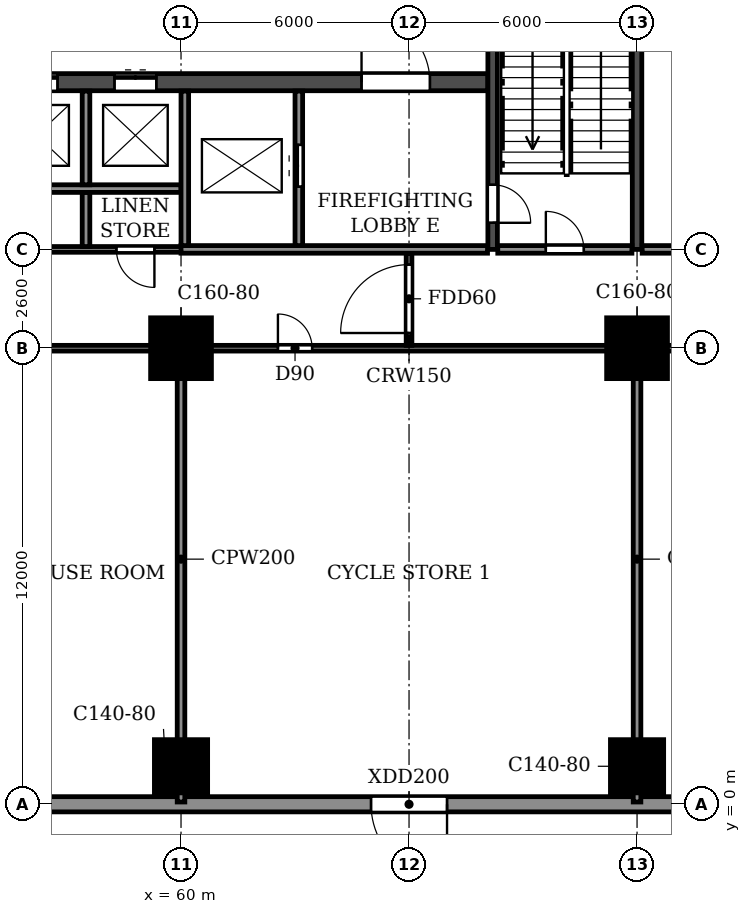
"""IFC4 building model, lengths in metres.
Left out: names, types, materials, properties, quantities, classifications, styles, units other than length and angle.
Written with IfcOpenShell. Run it as: python <this file> out.ifc"""

import sys

from ifc_helpers import new_model, si_unit, direction, frame, frame_2d, origin, origin_2d, place, context, subcontext, project, spatial, rectangle, extrude, source, transform, mapped, element, fill, save


model = new_model("IFC4")
c1 = context("Model", 3, precision=1e-05, world=origin(), true_north=direction((0.0, 1.0)))
c2 = subcontext(c1, "Body", "Model", "MODEL_VIEW")
j1 = project(units=[si_unit("LENGTHUNIT", "METRE"), si_unit("PLANEANGLEUNIT", "RADIAN")], contexts=[c1])
p1 = place(None, origin())
s1 = spatial("IfcSite", under=j1, at=p1, CompositionType="ELEMENT")
p2 = place(p1, origin())
s2 = spatial("IfcBuilding", under=s1, at=p2, CompositionType="ELEMENT")
p3 = place(p2, origin())
s3 = spatial("IfcBuildingStorey", under=s2, at=p3, CompositionType="ELEMENT", Elevation=0.0)
m1 = source(origin(), c2, "Body", "SweptSolid", [
    extrude(rectangle(XDim=1.4, YDim=1.4, at=origin_2d()), origin(), (0.0, 0.0, 1.0), 4.5),
])
p4 = place(p3, frame((60.0, 1.0, -0.3), z_axis=(0.0, 0.0, 1.0), x_axis=(1.0, 0.0, 0.0)))
e1 = element("IfcColumn", 1, at=p4, inside=s3, PredefinedType="COLUMN", context=c2, shape_type="MappedRepresentation", body=[
    mapped(m1, transform((0.0, 0.0, 0.0))),
])
m2 = source(origin(), c2, "Body", "SweptSolid", [
    extrude(rectangle(XDim=1.6, YDim=1.6, at=origin_2d()), origin(), (0.0, 0.0, 1.0), 4.5),
])
p5 = place(p3, frame((60.0, 12.0, -0.3), z_axis=(0.0, 0.0, 1.0), x_axis=(1.0, 0.0, 0.0)))
e2 = element("IfcColumn", 2, at=p5, inside=s3, PredefinedType="COLUMN", context=c2, shape_type="MappedRepresentation", body=[
    mapped(m2, transform((0.0, 0.0, 0.0))),
])
p6 = place(p3, frame((72.0, 1.0, -0.3), z_axis=(0.0, 0.0, 1.0), x_axis=(1.0, 0.0, 0.0)))
e3 = element("IfcColumn", 3, at=p6, inside=s3, PredefinedType="COLUMN", context=c2, shape_type="MappedRepresentation", body=[
    mapped(m1, transform((0.0, 0.0, 0.0))),
])
p7 = place(p3, frame((72.0, 12.0, -0.3), z_axis=(0.0, 0.0, 1.0), x_axis=(1.0, 0.0, 0.0)))
e4 = element("IfcColumn", 4, at=p7, inside=s3, PredefinedType="COLUMN", context=c2, shape_type="MappedRepresentation", body=[
    mapped(m2, transform((0.0, 0.0, 0.0))),
])
p8 = place(p3, frame((33.925, 19.0, 0.0), z_axis=(0.0, 0.0, 1.0), x_axis=(1.0, 0.0, 0.0)))
e5 = element("IfcWall", 5, at=p8, inside=s3, PredefinedType="SOLIDWALL", context=c2, shape_type="SweptSolid", body=[
    extrude(rectangle(XDim=34.15, YDim=0.45, at=frame_2d((17.075, 0.0))), origin(), (0.0, 0.0, 1.0), 4.2),
])
p9 = place(p8, frame((16.175, 0.0, 0.0)))
e6 = element("IfcOpeningElement", 6, at=p9, cuts=e5, PredefinedType="OPENING", context=c2, shape_type="SweptSolid", body=[
    extrude(rectangle(XDim=1.8, YDim=2.1, at=frame_2d((0.9, 1.05))), frame((0.0, 0.235, 0.0), z_axis=(0.0, -1.0, 0.0), x_axis=(1.0, 0.0, 0.0)), (0.0, 0.0, 1.0), 0.47),
])
p10 = place(p8, frame((1.525, 0.0, 0.0)))
e7 = element("IfcOpeningElement", 7, at=p10, cuts=e5, PredefinedType="OPENING", context=c2, shape_type="SweptSolid", body=[
    extrude(rectangle(XDim=1.8, YDim=2.1, at=frame_2d((0.9, 1.05))), frame((0.0, 0.235, 0.0), z_axis=(0.0, -1.0, 0.0), x_axis=(1.0, 0.0, 0.0)), (0.0, 0.0, 1.0), 0.47),
])
p11 = place(p8, frame((8.725, 0.0, 0.0)))
e8 = element("IfcOpeningElement", 8, at=p11, cuts=e5, PredefinedType="OPENING", context=c2, shape_type="SweptSolid", body=[
    extrude(rectangle(XDim=1.1, YDim=2.1, at=frame_2d((0.55, 1.05))), frame((0.0, 0.235, 0.0), z_axis=(0.0, -1.0, 0.0), x_axis=(1.0, 0.0, 0.0)), (0.0, 0.0, 1.0), 0.47),
])
p12 = place(p8, frame((11.325, 0.0, 0.0)))
e9 = element("IfcOpeningElement", 9, at=p12, cuts=e5, PredefinedType="OPENING", context=c2, shape_type="SweptSolid", body=[
    extrude(rectangle(XDim=1.1, YDim=2.1, at=frame_2d((0.55, 1.05))), frame((0.0, 0.235, 0.0), z_axis=(0.0, -1.0, 0.0), x_axis=(1.0, 0.0, 0.0)), (0.0, 0.0, 1.0), 0.47),
])
p13 = place(p8, frame((13.925, 0.0, 0.0)))
e10 = element("IfcOpeningElement", 10, at=p13, cuts=e5, PredefinedType="OPENING", context=c2, shape_type="SweptSolid", body=[
    extrude(rectangle(XDim=1.1, YDim=2.1, at=frame_2d((0.55, 1.05))), frame((0.0, 0.235, 0.0), z_axis=(0.0, -1.0, 0.0), x_axis=(1.0, 0.0, 0.0)), (0.0, 0.0, 1.0), 0.47),
])
p14 = place(p8, frame((19.125, 0.0, 0.0)))
e11 = element("IfcOpeningElement", 11, at=p14, cuts=e5, PredefinedType="OPENING", context=c2, shape_type="SweptSolid", body=[
    extrude(rectangle(XDim=1.1, YDim=2.1, at=frame_2d((0.55, 1.05))), frame((0.0, 0.235, 0.0), z_axis=(0.0, -1.0, 0.0), x_axis=(1.0, 0.0, 0.0)), (0.0, 0.0, 1.0), 0.47),
])
p15 = place(p8, frame((21.725, 0.0, 0.0)))
e12 = element("IfcOpeningElement", 12, at=p15, cuts=e5, PredefinedType="OPENING", context=c2, shape_type="SweptSolid", body=[
    extrude(rectangle(XDim=1.1, YDim=2.1, at=frame_2d((0.55, 1.05))), frame((0.0, 0.235, 0.0), z_axis=(0.0, -1.0, 0.0), x_axis=(1.0, 0.0, 0.0)), (0.0, 0.0, 1.0), 0.47),
])
p16 = place(p8, frame((24.325, 0.0, 0.0)))
e13 = element("IfcOpeningElement", 13, at=p16, cuts=e5, PredefinedType="OPENING", context=c2, shape_type="SweptSolid", body=[
    extrude(rectangle(XDim=1.1, YDim=2.1, at=frame_2d((0.55, 1.05))), frame((0.0, 0.235, 0.0), z_axis=(0.0, -1.0, 0.0), x_axis=(1.0, 0.0, 0.0)), (0.0, 0.0, 1.0), 0.47),
])
p17 = place(p8, frame((30.825, 0.0, 0.0)))
e14 = element("IfcOpeningElement", 14, at=p17, cuts=e5, PredefinedType="OPENING", context=c2, shape_type="SweptSolid", body=[
    extrude(rectangle(XDim=1.8, YDim=2.1, at=frame_2d((0.9, 1.05))), frame((0.0, 0.235, 0.0), z_axis=(0.0, -1.0, 0.0), x_axis=(1.0, 0.0, 0.0)), (0.0, 0.0, 1.0), 0.47),
])
p18 = place(p3, frame((68.2, 14.6, 0.0), z_axis=(0.0, 0.0, 1.0), x_axis=(0.0, 1.0, 0.0)))
e15 = element("IfcWall", 15, at=p18, inside=s3, PredefinedType="SOLIDWALL", context=c2, shape_type="SweptSolid", body=[
    extrude(rectangle(XDim=7.875, YDim=0.25, at=frame_2d((3.938, 0.0))), origin(), (0.0, 0.0, 1.0), 4.2),
])
p19 = place(p18, frame((0.7, 0.0, 0.0)))
e16 = element("IfcOpeningElement", 16, at=p19, cuts=e15, PredefinedType="OPENING", context=c2, shape_type="SweptSolid", body=[
    extrude(rectangle(XDim=1.0, YDim=2.1, at=frame_2d((0.5, 1.05))), frame((0.0, 0.135, 0.0), z_axis=(0.0, -1.0, 0.0), x_axis=(1.0, 0.0, 0.0)), (0.0, 0.0, 1.0), 0.27),
])
p20 = place(p3, frame((72.0, 14.6, 0.0), z_axis=(0.0, 0.0, 1.0), x_axis=(0.0, 1.0, 0.0)))
e17 = element("IfcWall", 17, at=p20, inside=s3, PredefinedType="SOLIDWALL", context=c2, shape_type="SweptSolid", body=[
    extrude(rectangle(XDim=7.875, YDim=0.25, at=frame_2d((3.938, 0.0))), origin(), (0.0, 0.0, 1.0), 4.2),
])
p21 = place(p3, frame((-0.2, 0.0, 0.0), z_axis=(0.0, 0.0, 1.0), x_axis=(1.0, 0.0, 0.0)))
e18 = element("IfcWall", 18, at=p21, inside=s3, PredefinedType="STANDARD", context=c2, shape_type="SweptSolid", body=[
    extrude(rectangle(XDim=102.4, YDim=0.4, at=frame_2d((51.2, 0.0))), origin(), (0.0, 0.0, 1.0), 4.2),
])
p22 = place(p21, frame((13.6, 0.0, 0.0)))
e19 = element("IfcOpeningElement", 19, at=p22, cuts=e18, PredefinedType="OPENING", context=c2, shape_type="SweptSolid", body=[
    extrude(rectangle(XDim=2.0, YDim=2.4, at=frame_2d((1.0, 1.2))), frame((0.0, 0.21, 0.0), z_axis=(0.0, -1.0, 0.0), x_axis=(1.0, 0.0, 0.0)), (0.0, 0.0, 1.0), 0.42),
])
p23 = place(p21, frame((43.2, 0.0, 0.0)))
e20 = element("IfcOpeningElement", 20, at=p23, cuts=e18, PredefinedType="OPENING", context=c2, shape_type="SweptSolid", body=[
    extrude(rectangle(XDim=1.0, YDim=2.1, at=frame_2d((0.5, 1.05))), frame((0.0, 0.21, 0.0), z_axis=(0.0, -1.0, 0.0), x_axis=(1.0, 0.0, 0.0)), (0.0, 0.0, 1.0), 0.42),
])
p24 = place(p21, frame((49.6, 0.0, 0.0)))
e21 = element("IfcOpeningElement", 21, at=p24, cuts=e18, PredefinedType="OPENING", context=c2, shape_type="SweptSolid", body=[
    extrude(rectangle(XDim=2.0, YDim=2.4, at=frame_2d((1.0, 1.2))), frame((0.0, 0.21, 0.0), z_axis=(0.0, -1.0, 0.0), x_axis=(1.0, 0.0, 0.0)), (0.0, 0.0, 1.0), 0.42),
])
p25 = place(p21, frame((55.2, 0.0, 0.0)))
e22 = element("IfcOpeningElement", 22, at=p25, cuts=e18, PredefinedType="OPENING", context=c2, shape_type="SweptSolid", body=[
    extrude(rectangle(XDim=1.0, YDim=2.1, at=frame_2d((0.5, 1.05))), frame((0.0, 0.21, 0.0), z_axis=(0.0, -1.0, 0.0), x_axis=(1.0, 0.0, 0.0)), (0.0, 0.0, 1.0), 0.42),
])
p26 = place(p21, frame((65.2, 0.0, 0.0)))
e23 = element("IfcOpeningElement", 23, at=p26, cuts=e18, PredefinedType="OPENING", context=c2, shape_type="SweptSolid", body=[
    extrude(rectangle(XDim=2.0, YDim=2.4, at=frame_2d((1.0, 1.2))), frame((0.0, 0.21, 0.0), z_axis=(0.0, -1.0, 0.0), x_axis=(1.0, 0.0, 0.0)), (0.0, 0.0, 1.0), 0.42),
])
p27 = place(p21, frame((77.2, 0.0, 0.0)))
e24 = element("IfcOpeningElement", 24, at=p27, cuts=e18, PredefinedType="OPENING", context=c2, shape_type="SweptSolid", body=[
    extrude(rectangle(XDim=2.0, YDim=2.4, at=frame_2d((1.0, 1.2))), frame((0.0, 0.21, 0.0), z_axis=(0.0, -1.0, 0.0), x_axis=(1.0, 0.0, 0.0)), (0.0, 0.0, 1.0), 0.42),
])
p28 = place(p21, frame((86.2, 0.0, 0.0)))
e25 = element("IfcOpeningElement", 25, at=p28, cuts=e18, PredefinedType="OPENING", context=c2, shape_type="SweptSolid", body=[
    extrude(rectangle(XDim=2.0, YDim=2.4, at=frame_2d((1.0, 1.2))), frame((0.0, 0.21, 0.0), z_axis=(0.0, -1.0, 0.0), x_axis=(1.0, 0.0, 0.0)), (0.0, 0.0, 1.0), 0.42),
])
p29 = place(p21, frame((90.7, 0.0, 0.0)))
e26 = element("IfcOpeningElement", 26, at=p29, cuts=e18, PredefinedType="OPENING", context=c2, shape_type="SweptSolid", body=[
    extrude(rectangle(XDim=2.0, YDim=2.4, at=frame_2d((1.0, 1.2))), frame((0.0, 0.21, 0.0), z_axis=(0.0, -1.0, 0.0), x_axis=(1.0, 0.0, 0.0)), (0.0, 0.0, 1.0), 0.42),
])
p30 = place(p21, frame((98.2, 0.0, 0.0)))
e27 = element("IfcOpeningElement", 27, at=p30, cuts=e18, PredefinedType="OPENING", context=c2, shape_type="SweptSolid", body=[
    extrude(rectangle(XDim=2.0, YDim=2.4, at=frame_2d((1.0, 1.2))), frame((0.0, 0.21, 0.0), z_axis=(0.0, -1.0, 0.0), x_axis=(1.0, 0.0, 0.0)), (0.0, 0.0, 1.0), 0.42),
])
p31 = place(p3, frame((38.9, 12.0, 0.0), z_axis=(0.0, 0.0, 1.0), x_axis=(1.0, 0.0, 0.0)))
e28 = element("IfcWall", 28, at=p31, inside=s3, PredefinedType="PARTITIONING", context=c2, shape_type="SweptSolid", body=[
    extrude(rectangle(XDim=63.1, YDim=0.15, at=frame_2d((31.55, 0.0))), origin(), (0.0, 0.0, 1.0), 4.2),
])
p32 = place(p31, frame((10.2, 0.0, 0.0)))
e29 = element("IfcOpeningElement", 29, at=p32, cuts=e28, PredefinedType="OPENING", context=c2, shape_type="SweptSolid", body=[
    extrude(rectangle(XDim=1.8, YDim=2.1, at=frame_2d((0.9, 1.05))), frame((0.0, 0.085, 0.0), z_axis=(0.0, -1.0, 0.0), x_axis=(1.0, 0.0, 0.0)), (0.0, 0.0, 1.0), 0.17),
])
p33 = place(p31, frame((23.65, 0.0, 0.0)))
e30 = element("IfcOpeningElement", 30, at=p33, cuts=e28, PredefinedType="OPENING", context=c2, shape_type="SweptSolid", body=[
    extrude(rectangle(XDim=0.9, YDim=2.1, at=frame_2d((0.45, 1.05))), frame((0.0, 0.085, 0.0), z_axis=(0.0, -1.0, 0.0), x_axis=(1.0, 0.0, 0.0)), (0.0, 0.0, 1.0), 0.17),
])
p34 = place(p31, frame((38.65, 0.0, 0.0)))
e31 = element("IfcOpeningElement", 31, at=p34, cuts=e28, PredefinedType="OPENING", context=c2, shape_type="SweptSolid", body=[
    extrude(rectangle(XDim=0.9, YDim=2.1, at=frame_2d((0.45, 1.05))), frame((0.0, 0.085, 0.0), z_axis=(0.0, -1.0, 0.0), x_axis=(1.0, 0.0, 0.0)), (0.0, 0.0, 1.0), 0.17),
])
p35 = place(p31, frame((51.7, 0.0, 0.0)))
e32 = element("IfcOpeningElement", 32, at=p35, cuts=e28, PredefinedType="OPENING", context=c2, shape_type="SweptSolid", body=[
    extrude(rectangle(XDim=1.8, YDim=2.1, at=frame_2d((0.9, 1.05))), frame((0.0, 0.085, 0.0), z_axis=(0.0, -1.0, 0.0), x_axis=(1.0, 0.0, 0.0)), (0.0, 0.0, 1.0), 0.17),
])
p36 = place(p3, frame((44.4, 14.6, 0.0), z_axis=(0.0, 0.0, 1.0), x_axis=(1.0, 0.0, 0.0)))
e33 = element("IfcWall", 33, at=p36, inside=s3, PredefinedType="PARTITIONING", context=c2, shape_type="SweptSolid", body=[
    extrude(rectangle(XDim=15.8, YDim=0.15, at=frame_2d((7.9, 0.0))), origin(), (0.0, 0.0, 1.0), 4.2),
])
p37 = place(p36, frame((2.2, 0.0, 0.0)))
e34 = element("IfcOpeningElement", 34, at=p37, cuts=e33, PredefinedType="OPENING", context=c2, shape_type="SweptSolid", body=[
    extrude(rectangle(XDim=1.0, YDim=2.1, at=frame_2d((0.5, 1.05))), frame((0.0, 0.085, 0.0), z_axis=(0.0, -1.0, 0.0), x_axis=(1.0, 0.0, 0.0)), (0.0, 0.0, 1.0), 0.17),
])
p38 = place(p36, frame((6.1, 0.0, 0.0)))
e35 = element("IfcOpeningElement", 35, at=p38, cuts=e33, PredefinedType="OPENING", context=c2, shape_type="SweptSolid", body=[
    extrude(rectangle(XDim=1.0, YDim=2.1, at=frame_2d((0.5, 1.05))), frame((0.0, 0.085, 0.0), z_axis=(0.0, -1.0, 0.0), x_axis=(1.0, 0.0, 0.0)), (0.0, 0.0, 1.0), 0.17),
])
p39 = place(p36, frame((10.0, 0.0, 0.0)))
e36 = element("IfcOpeningElement", 36, at=p39, cuts=e33, PredefinedType="OPENING", context=c2, shape_type="SweptSolid", body=[
    extrude(rectangle(XDim=1.0, YDim=2.1, at=frame_2d((0.5, 1.05))), frame((0.0, 0.085, 0.0), z_axis=(0.0, -1.0, 0.0), x_axis=(1.0, 0.0, 0.0)), (0.0, 0.0, 1.0), 0.17),
])
p40 = place(p36, frame((13.9, 0.0, 0.0)))
e37 = element("IfcOpeningElement", 37, at=p40, cuts=e33, PredefinedType="OPENING", context=c2, shape_type="SweptSolid", body=[
    extrude(rectangle(XDim=1.0, YDim=2.1, at=frame_2d((0.5, 1.05))), frame((0.0, 0.085, 0.0), z_axis=(0.0, -1.0, 0.0), x_axis=(1.0, 0.0, 0.0)), (0.0, 0.0, 1.0), 0.17),
])
p41 = place(p3, frame((66.0, 12.075, 0.0), z_axis=(0.0, 0.0, 1.0), x_axis=(0.0, 1.0, 0.0)))
e38 = element("IfcWall", 38, at=p41, inside=s3, PredefinedType="PARTITIONING", context=c2, shape_type="SweptSolid", body=[
    extrude(rectangle(XDim=2.425, YDim=0.15, at=frame_2d((1.212, 0.0))), origin(), (0.0, 0.0, 1.0), 4.2),
])
p42 = place(p41, frame((0.325, 0.0, 0.0)))
e39 = element("IfcOpeningElement", 39, at=p42, cuts=e38, PredefinedType="OPENING", context=c2, shape_type="SweptSolid", body=[
    extrude(rectangle(XDim=1.8, YDim=2.1, at=frame_2d((0.9, 1.05))), frame((0.0, 0.085, 0.0), z_axis=(0.0, -1.0, 0.0), x_axis=(1.0, 0.0, 0.0)), (0.0, 0.0, 1.0), 0.17),
])
p43 = place(p3, frame((72.135, 14.6, 0.0), z_axis=(0.0, 0.0, 1.0), x_axis=(1.0, 0.0, 0.0)))
e40 = element("IfcWall", 40, at=p43, inside=s3, PredefinedType="PARTITIONING", context=c2, shape_type="SweptSolid", body=[
    extrude(rectangle(XDim=5.13, YDim=0.2, at=frame_2d((2.565, 0.0))), origin(), (0.0, 0.0, 1.0), 4.2),
])
p44 = place(p43, frame((1.815, 0.0, 0.0)))
e41 = element("IfcOpeningElement", 41, at=p44, cuts=e40, PredefinedType="OPENING", context=c2, shape_type="SweptSolid", body=[
    extrude(rectangle(XDim=1.5, YDim=2.1, at=frame_2d((0.75, 1.05))), frame((0.0, 0.11, 0.0), z_axis=(0.0, -1.0, 0.0), x_axis=(1.0, 0.0, 0.0)), (0.0, 0.0, 1.0), 0.22),
])
p45 = place(p3, frame((57.5, 14.675, 0.0), z_axis=(0.0, 0.0, 1.0), x_axis=(0.0, 1.0, 0.0)))
e42 = element("IfcWall", 42, at=p45, inside=s3, PredefinedType="PARTITIONING", context=c2, shape_type="SweptSolid", body=[
    extrude(rectangle(XDim=1.425, YDim=0.2, at=frame_2d((0.712, 0.0))), origin(), (0.0, 0.0, 1.0), 4.2),
])
for number, where, z_axis, x_axis in (
    (43, (60.0, 0.06, 0.0), (0.0, 0.0, 1.0), (0.0, 1.0, 0.0)),
    (44, (72.0, 0.06, 0.0), (0.0, 0.0, 1.0), (0.0, 1.0, 0.0)),
):
    element("IfcWall", number, at=place(p3, frame(where, z_axis=z_axis, x_axis=x_axis)), inside=s3, PredefinedType="PARTITIONING", context=c2, shape_type="SweptSolid", body=[
        extrude(rectangle(XDim=11.865, YDim=0.2, at=frame_2d((5.933, 0.0))), origin(), (0.0, 0.0, 1.0), 4.2),
    ])
p46 = place(p3, frame((60.0, 14.6, 0.0), z_axis=(0.0, 0.0, 1.0), x_axis=(1.0, 0.0, 0.0)))
e45 = element("IfcWall", 45, at=p46, inside=s3, PredefinedType="PARTITIONING", context=c2, shape_type="SweptSolid", body=[
    extrude(rectangle(XDim=8.065, YDim=0.2, at=frame_2d((4.032, 0.0))), origin(), (0.0, 0.0, 1.0), 4.2),
])
p47 = place(p3, frame((52.2, 16.2, 0.0), z_axis=(0.0, 0.0, 1.0), x_axis=(1.0, 0.0, 0.0)))
e46 = element("IfcWall", 46, at=p47, inside=s3, PredefinedType="PARTITIONING", context=c2, shape_type="SweptSolid", body=[
    extrude(rectangle(XDim=7.8, YDim=0.2, at=frame_2d((3.9, 0.0))), origin(), (0.0, 0.0, 1.0), 4.2),
])
p48 = place(p3, frame((57.5, 16.3, 0.0), z_axis=(0.0, 0.0, 1.0), x_axis=(0.0, 1.0, 0.0)))
e47 = element("IfcWall", 47, at=p48, inside=s3, PredefinedType="PARTITIONING", context=c2, shape_type="SweptSolid", body=[
    extrude(rectangle(XDim=2.465, YDim=0.2, at=frame_2d((1.232, 0.0))), origin(), (0.0, 0.0, 1.0), 4.2),
])
p49 = place(p3, frame((60.1, 14.7, 0.0), z_axis=(0.0, 0.0, 1.0), x_axis=(0.0, 1.0, 0.0)))
e48 = element("IfcWall", 48, at=p49, inside=s3, PredefinedType="PARTITIONING", context=c2, shape_type="SweptSolid", body=[
    extrude(rectangle(XDim=4.065, YDim=0.2, at=frame_2d((2.032, 0.0))), origin(), (0.0, 0.0, 1.0), 4.2),
])
p50 = place(p3, frame((63.1, 14.7, 0.0), z_axis=(0.0, 0.0, 1.0), x_axis=(0.0, 1.0, 0.0)))
e49 = element("IfcWall", 49, at=p50, inside=s3, PredefinedType="PARTITIONING", context=c2, shape_type="SweptSolid", body=[
    extrude(rectangle(XDim=4.065, YDim=0.2, at=frame_2d((2.032, 0.0))), origin(), (0.0, 0.0, 1.0), 4.2),
])
p51 = place(p50, frame((1.55, 0.0, 0.0)))
e50 = element("IfcOpeningElement", 50, at=p51, cuts=e49, PredefinedType="OPENING", context=c2, shape_type="SweptSolid", body=[
    extrude(rectangle(XDim=1.1, YDim=2.1, at=frame_2d((0.55, 1.05))), frame((0.0, 0.11, 0.0), z_axis=(0.0, -1.0, 0.0), x_axis=(1.0, 0.0, 0.0)), (0.0, 0.0, 1.0), 0.22),
])
p52 = place(p3, frame((68.335, 14.6, 0.0), z_axis=(0.0, 0.0, 1.0), x_axis=(1.0, 0.0, 0.0)))
e51 = element("IfcWall", 51, at=p52, inside=s3, PredefinedType="PARTITIONING", context=c2, shape_type="SweptSolid", body=[
    extrude(rectangle(XDim=3.53, YDim=0.2, at=frame_2d((1.765, 0.0))), origin(), (0.0, 0.0, 1.0), 4.2),
])
p53 = place(p52, frame((1.265, 0.0, 0.0)))
e52 = element("IfcOpeningElement", 52, at=p53, cuts=e51, PredefinedType="OPENING", context=c2, shape_type="SweptSolid", body=[
    extrude(rectangle(XDim=1.0, YDim=2.1, at=frame_2d((0.5, 1.05))), frame((0.0, 0.11, 0.0), z_axis=(0.0, -1.0, 0.0), x_axis=(1.0, 0.0, 0.0)), (0.0, 0.0, 1.0), 0.22),
])
p54 = place(p26, frame((2.0, 0.0, 0.0), z_axis=(0.0, 0.0, 1.0), x_axis=(-1.0, 0.0, 0.0)))
e53 = element("IfcDoor", 53, at=p54, inside=s3, OperationType="DOUBLE_DOOR_SINGLE_SWING", PredefinedType="DOOR", context=c2, shape_type="SweptSolid", body=[
    extrude(rectangle(XDim=2.0, YDim=2.4, at=frame_2d((1.0, 1.2))), frame((0.0, 0.025, 0.0), z_axis=(0.0, -1.0, 0.0), x_axis=(1.0, 0.0, 0.0)), (0.0, 0.0, 1.0), 0.05),
])
fill(e23, e53)
p55 = place(p40, frame((1.0, 0.0, 0.0), z_axis=(0.0, 0.0, 1.0), x_axis=(-1.0, 0.0, 0.0)))
e54 = element("IfcDoor", 54, at=p55, inside=s3, OperationType="SINGLE_SWING_LEFT", PredefinedType="DOOR", context=c2, shape_type="SweptSolid", body=[
    extrude(rectangle(XDim=1.0, YDim=2.1, at=frame_2d((0.5, 1.05))), frame((0.0, 0.025, 0.0), z_axis=(0.0, -1.0, 0.0), x_axis=(1.0, 0.0, 0.0)), (0.0, 0.0, 1.0), 0.05),
])
fill(e37, e54)
p56 = place(p33, origin())
e55 = element("IfcDoor", 55, at=p56, inside=s3, OperationType="SINGLE_SWING_LEFT", PredefinedType="DOOR", context=c2, shape_type="SweptSolid", body=[
    extrude(rectangle(XDim=0.9, YDim=2.1, at=frame_2d((0.45, 1.05))), frame((0.0, 0.025, 0.0), z_axis=(0.0, -1.0, 0.0), x_axis=(1.0, 0.0, 0.0)), (0.0, 0.0, 1.0), 0.05),
])
fill(e30, e55)
p57 = place(p42, origin())
e56 = element("IfcDoor", 56, at=p57, inside=s3, OperationType="DOUBLE_DOOR_SINGLE_SWING", PredefinedType="DOOR", context=c2, shape_type="SweptSolid", body=[
    extrude(rectangle(XDim=1.8, YDim=2.1, at=frame_2d((0.9, 1.05))), frame((0.0, 0.025, 0.0), z_axis=(0.0, -1.0, 0.0), x_axis=(1.0, 0.0, 0.0)), (0.0, 0.0, 1.0), 0.05),
])
fill(e39, e56)
p58 = place(p53, origin())
e57 = element("IfcDoor", 57, at=p58, inside=s3, OperationType="SINGLE_SWING_LEFT", PredefinedType="DOOR", context=c2, shape_type="SweptSolid", body=[
    extrude(rectangle(XDim=1.0, YDim=2.1, at=frame_2d((0.5, 1.05))), frame((0.0, 0.025, 0.0), z_axis=(0.0, -1.0, 0.0), x_axis=(1.0, 0.0, 0.0)), (0.0, 0.0, 1.0), 0.05),
])
fill(e52, e57)
p59 = place(p51, origin())
e58 = element("IfcDoor", 58, at=p59, inside=s3, OperationType="DOUBLE_DOOR_SLIDING", PredefinedType="DOOR", context=c2, shape_type="SweptSolid", body=[
    extrude(rectangle(XDim=1.1, YDim=2.1, at=frame_2d((0.55, 1.05))), frame((0.0, 0.025, 0.0), z_axis=(0.0, -1.0, 0.0), x_axis=(1.0, 0.0, 0.0)), (0.0, 0.0, 1.0), 0.05),
])
fill(e50, e58)
p60 = place(p19, frame((1.0, 0.0, 0.0), z_axis=(0.0, 0.0, 1.0), x_axis=(-1.0, 0.0, 0.0)))
e59 = element("IfcDoor", 59, at=p60, inside=s3, OperationType="SINGLE_SWING_RIGHT", PredefinedType="DOOR", context=c2, shape_type="SweptSolid", body=[
    extrude(rectangle(XDim=1.0, YDim=2.1, at=frame_2d((0.5, 1.05))), frame((0.0, 0.025, 0.0), z_axis=(0.0, -1.0, 0.0), x_axis=(1.0, 0.0, 0.0)), (0.0, 0.0, 1.0), 0.05),
])
fill(e16, e59)
p61 = place(p15, origin())
e60 = element("IfcDoor", 60, at=p61, inside=s3, OperationType="DOUBLE_DOOR_SLIDING", PredefinedType="DOOR", context=c2, shape_type="SweptSolid", body=[
    extrude(rectangle(XDim=1.1, YDim=2.1, at=frame_2d((0.55, 1.05))), frame((0.0, 0.025, 0.0), z_axis=(0.0, -1.0, 0.0), x_axis=(1.0, 0.0, 0.0)), (0.0, 0.0, 1.0), 0.05),
])
fill(e12, e60)
p62 = place(p16, origin())
e61 = element("IfcDoor", 61, at=p62, inside=s3, OperationType="DOUBLE_DOOR_SLIDING", PredefinedType="DOOR", context=c2, shape_type="SweptSolid", body=[
    extrude(rectangle(XDim=1.1, YDim=2.1, at=frame_2d((0.55, 1.05))), frame((0.0, 0.025, 0.0), z_axis=(0.0, -1.0, 0.0), x_axis=(1.0, 0.0, 0.0)), (0.0, 0.0, 1.0), 0.05),
])
fill(e13, e61)
p63 = place(p17, origin())
e62 = element("IfcDoor", 62, at=p63, inside=s3, OperationType="DOUBLE_DOOR_SINGLE_SWING", PredefinedType="DOOR", context=c2, shape_type="SweptSolid", body=[
    extrude(rectangle(XDim=1.8, YDim=2.1, at=frame_2d((0.9, 1.05))), frame((0.0, 0.025, 0.0), z_axis=(0.0, -1.0, 0.0), x_axis=(1.0, 0.0, 0.0)), (0.0, 0.0, 1.0), 0.05),
])
fill(e14, e62)
save(model, sys.argv[1])
